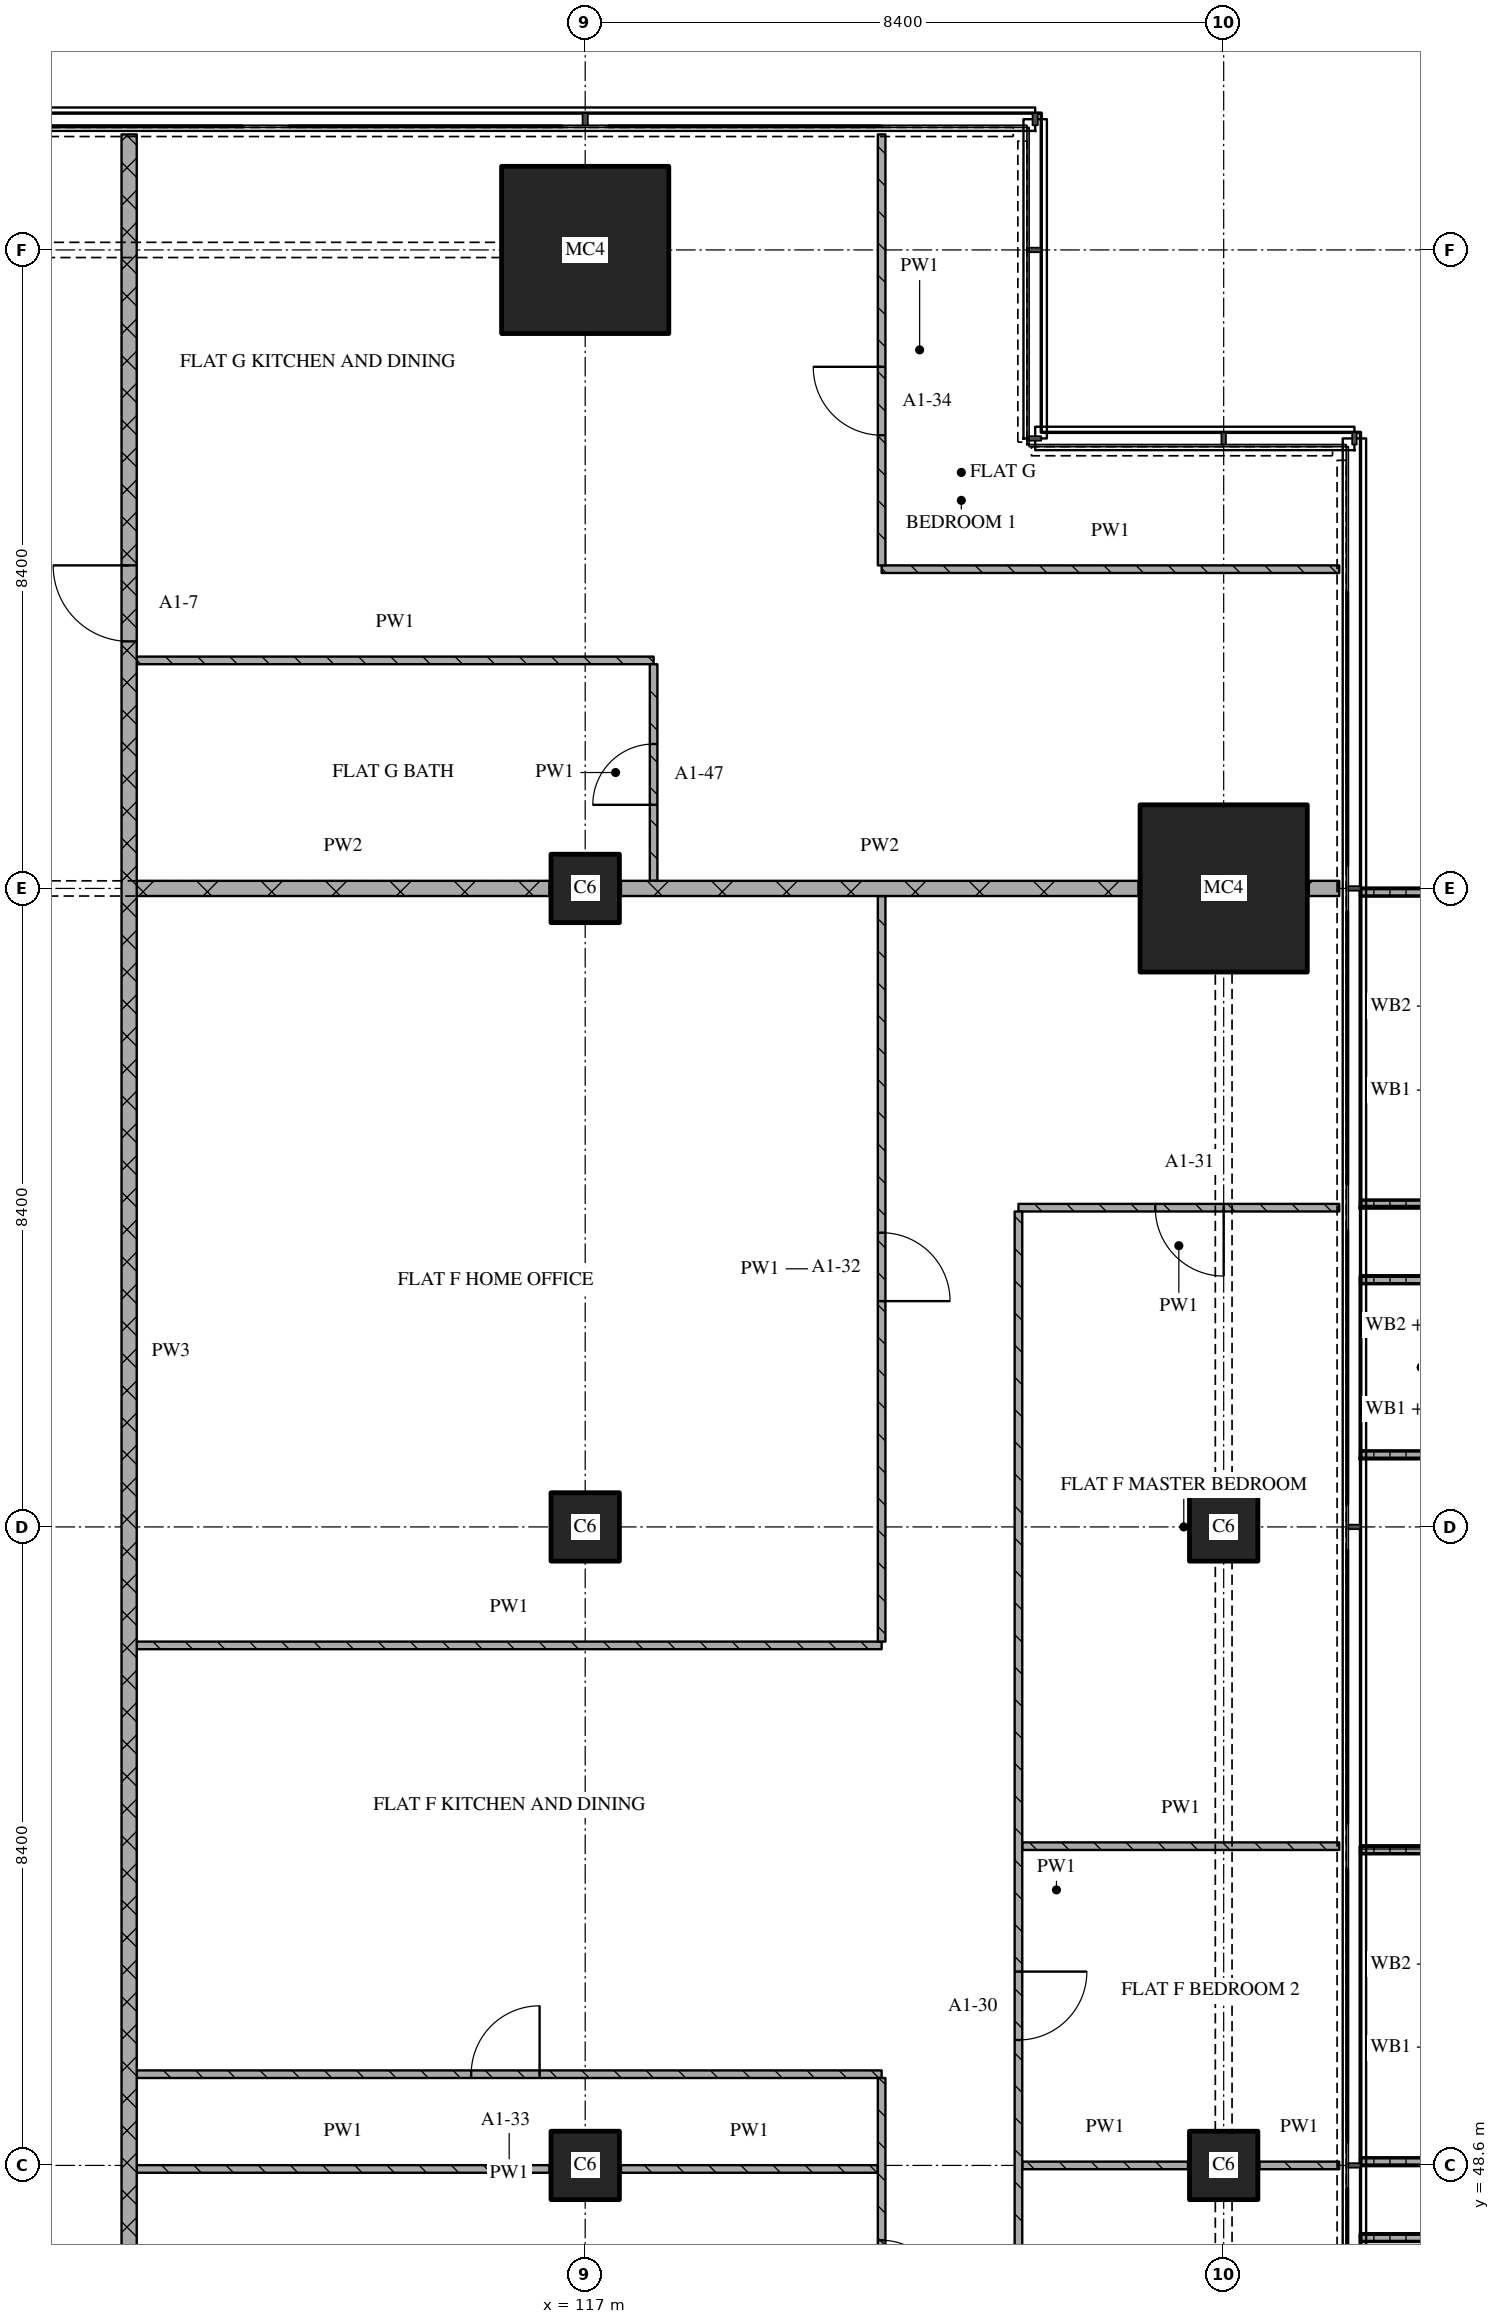
"""IFC4 building model, lengths in metres.
Left out: names, types, materials, properties, quantities, classifications, styles, units other than length and angle.
Written with IfcOpenShell. Run it as: python <this file> out.ifc"""

import sys

from ifc_helpers import new_model, si_unit, direction, frame, frame_2d, origin, origin_2d, place, context, subcontext, project, spatial, polyline, rectangle, outline, extrude, element, fill, save


model = new_model("IFC4")
c1 = context("Model", 3, precision=1e-05, world=origin(), true_north=direction((0.0, 1.0)))
c2 = subcontext(c1, "Body", "Model", "MODEL_VIEW")
j1 = project(units=[si_unit("LENGTHUNIT", "METRE"), si_unit("PLANEANGLEUNIT", "RADIAN")], contexts=[c1])
p1 = place(None, origin())
s1 = spatial("IfcSite", under=j1, at=p1, CompositionType="ELEMENT")
p2 = place(p1, origin())
s2 = spatial("IfcBuilding", under=s1, at=p2, CompositionType="ELEMENT")
p3 = place(p2, frame((0.0, 0.0, 40.8)))
s3 = spatial("IfcBuildingStorey", under=s2, at=p3, CompositionType="ELEMENT", Elevation=40.8)
for number, where, z_axis, x_axis in (
    (1, (117.0, 48.6, 0.0), (0.0, 0.0, 1.0), (1.0, 0.0, 0.0)),
    (2, (117.0, 57.0, 0.0), (0.0, 0.0, 1.0), (1.0, 0.0, 0.0)),
    (3, (117.0, 65.4, 0.0), (0.0, 0.0, 1.0), (1.0, 0.0, 0.0)),
):
    element("IfcColumn", number, at=place(p3, frame(where, z_axis=z_axis, x_axis=x_axis)), inside=s3, PredefinedType="COLUMN", context=c2, shape_type="SweptSolid", body=[
        extrude(rectangle(XDim=0.9, YDim=0.9, at=origin_2d()), origin(), (0.0, 0.0, 1.0), 3.6),
    ])
p4 = place(p3, frame((117.0, 73.8, 0.0), z_axis=(0.0, 0.0, 1.0), x_axis=(1.0, 0.0, 0.0)))
e4 = element("IfcColumn", 4, at=p4, inside=s3, PredefinedType="COLUMN", context=c2, shape_type="SweptSolid", body=[
    extrude(rectangle(XDim=2.2, YDim=2.2, at=origin_2d()), origin(), (0.0, 0.0, 1.0), 3.6),
])
for number, where, z_axis, x_axis in (
    (5, (125.4, 48.6, 0.0), (0.0, 0.0, 1.0), (1.0, 0.0, 0.0)),
    (6, (125.4, 57.0, 0.0), (0.0, 0.0, 1.0), (1.0, 0.0, 0.0)),
):
    element("IfcColumn", number, at=place(p3, frame(where, z_axis=z_axis, x_axis=x_axis)), inside=s3, PredefinedType="COLUMN", context=c2, shape_type="SweptSolid", body=[
        extrude(rectangle(XDim=0.9, YDim=0.9, at=origin_2d()), origin(), (0.0, 0.0, 1.0), 3.6),
    ])
p5 = place(p3, frame((125.4, 65.4, 0.0), z_axis=(0.0, 0.0, 1.0), x_axis=(1.0, 0.0, 0.0)))
e7 = element("IfcColumn", 7, at=p5, inside=s3, PredefinedType="COLUMN", context=c2, shape_type="SweptSolid", body=[
    extrude(rectangle(XDim=2.2, YDim=2.2, at=origin_2d()), origin(), (0.0, 0.0, 1.0), 3.6),
])
p6 = place(p3, origin())
e8 = element("IfcWall", 8, at=p6, inside=s3, PredefinedType="SOLIDWALL", context=c2, shape_type="SweptSolid", body=[
    extrude(outline(polyline([(127.2, 45.3), (127.2, 45.4), (128.7, 45.4), (128.7, 47.6), (127.2, 47.6), (127.2, 47.7), (128.8, 47.7), (128.8, 45.3), (127.2, 45.3)])), origin(), (0.0, 0.0, 1.0), 1.0),
])
p7 = place(p3, origin())
e9 = element("IfcWall", 9, at=p7, inside=s3, PredefinedType="SOLIDWALL", context=c2, shape_type="SweptSolid", body=[
    extrude(outline(polyline([(127.2, 48.6), (127.2, 48.7), (128.833, 48.7), (128.833, 52.7), (127.2, 52.7), (127.2, 52.8), (128.933, 52.8), (128.933, 48.6), (127.2, 48.6)])), origin(), (0.0, 0.0, 1.0), 1.0),
])
p8 = place(p3, origin())
e10 = element("IfcWall", 10, at=p8, inside=s3, PredefinedType="SOLIDWALL", context=c2, shape_type="SweptSolid", body=[
    extrude(outline(polyline([(127.2, 57.9), (127.2, 58.0), (128.7, 58.0), (128.7, 60.2), (127.2, 60.2), (127.2, 60.3), (128.8, 60.3), (128.8, 57.9), (127.2, 57.9)])), origin(), (0.0, 0.0, 1.0), 1.0),
])
p9 = place(p3, origin())
e11 = element("IfcWall", 11, at=p9, inside=s3, PredefinedType="SOLIDWALL", context=c2, shape_type="SweptSolid", body=[
    extrude(outline(polyline([(127.2, 61.2), (127.2, 61.3), (128.833, 61.3), (128.833, 65.3), (127.2, 65.3), (127.2, 65.4), (128.933, 65.4), (128.933, 61.2), (127.2, 61.2)])), origin(), (0.0, 0.0, 1.0), 1.0),
])
p10 = place(p3, frame((111.1, 48.553, 0.0), z_axis=(0.0, 0.0, 1.0), x_axis=(1.0, 0.0, 0.0)))
e12 = element("IfcWall", 12, at=p10, inside=s3, PredefinedType="PARTITIONING", context=c2, shape_type="SweptSolid", body=[
    extrude(rectangle(XDim=5.43, YDim=0.1, at=frame_2d((2.715, 0.0))), origin(), (0.0, 0.0, 1.0), 3.32),
])
p11 = place(p3, frame((117.47, 48.553, 0.0), z_axis=(0.0, 0.0, 1.0), x_axis=(1.0, 0.0, 0.0)))
e13 = element("IfcWall", 13, at=p11, inside=s3, PredefinedType="PARTITIONING", context=c2, shape_type="SweptSolid", body=[
    extrude(rectangle(XDim=3.38, YDim=0.1, at=frame_2d((1.69, 0.0))), origin(), (0.0, 0.0, 1.0), 3.32),
])
p12 = place(p3, frame((122.75, 48.6, 0.0), z_axis=(0.0, 0.0, 1.0), x_axis=(1.0, 0.0, 0.0)))
e14 = element("IfcWall", 14, at=p12, inside=s3, PredefinedType="PARTITIONING", context=c2, shape_type="SweptSolid", body=[
    extrude(rectangle(XDim=2.18, YDim=0.1, at=frame_2d((1.09, 0.0))), origin(), (0.0, 0.0, 1.0), 3.32),
])
p13 = place(p3, frame((125.87, 48.6, 0.0), z_axis=(0.0, 0.0, 1.0), x_axis=(1.0, 0.0, 0.0)))
e15 = element("IfcWall", 15, at=p13, inside=s3, PredefinedType="PARTITIONING", context=c2, shape_type="SweptSolid", body=[
    extrude(rectangle(XDim=1.05, YDim=0.1, at=frame_2d((0.525, 0.0))), origin(), (0.0, 0.0, 1.0), 3.32),
])
p14 = place(p3, frame((120.9, 49.8, 0.0), z_axis=(0.0, 0.0, 1.0), x_axis=(-1.0, 0.0, 0.0)))
e16 = element("IfcWall", 16, at=p14, inside=s3, PredefinedType="PARTITIONING", context=c2, shape_type="SweptSolid", body=[
    extrude(rectangle(XDim=9.8, YDim=0.1, at=frame_2d((4.9, 0.0))), origin(), (0.0, 0.0, 1.0), 3.32),
])
p15 = place(p14, frame((4.5, 0.0, 0.0)))
e17 = element("IfcOpeningElement", 17, at=p15, cuts=e16, PredefinedType="OPENING", context=c2, shape_type="SweptSolid", body=[
    extrude(rectangle(XDim=0.9, YDim=2.1, at=frame_2d((0.45, 1.05))), frame((0.0, 0.06, 0.0), z_axis=(0.0, -1.0, 0.0), x_axis=(1.0, 0.0, 0.0)), (0.0, 0.0, 1.0), 0.12),
])
p16 = place(p3, frame((122.75, 52.8, 0.0), z_axis=(0.0, 0.0, 1.0), x_axis=(1.0, 0.0, 0.0)))
e18 = element("IfcWall", 18, at=p16, inside=s3, PredefinedType="PARTITIONING", context=c2, shape_type="SweptSolid", body=[
    extrude(rectangle(XDim=4.17, YDim=0.1, at=frame_2d((2.085, 0.0))), origin(), (0.0, 0.0, 1.0), 3.32),
])
p17 = place(p3, frame((111.1, 55.441, 0.0), z_axis=(0.0, 0.0, 1.0), x_axis=(1.0, 0.0, 0.0)))
e19 = element("IfcWall", 19, at=p17, inside=s3, PredefinedType="PARTITIONING", context=c2, shape_type="SweptSolid", body=[
    extrude(rectangle(XDim=9.8, YDim=0.1, at=frame_2d((4.9, 0.0))), origin(), (0.0, 0.0, 1.0), 3.32),
])
p18 = place(p3, frame((126.92, 61.2, 0.0), z_axis=(0.0, 0.0, 1.0), x_axis=(-1.0, 0.0, 0.0)))
e20 = element("IfcWall", 20, at=p18, inside=s3, PredefinedType="PARTITIONING", context=c2, shape_type="SweptSolid", body=[
    extrude(rectangle(XDim=4.22, YDim=0.1, at=frame_2d((2.11, 0.0))), origin(), (0.0, 0.0, 1.0), 3.32),
])
p19 = place(p18, frame((1.52, 0.0, 0.0)))
e21 = element("IfcOpeningElement", 21, at=p19, cuts=e20, PredefinedType="OPENING", context=c2, shape_type="SweptSolid", body=[
    extrude(rectangle(XDim=0.9, YDim=2.1, at=frame_2d((0.45, 1.05))), frame((0.0, 0.06, 0.0), z_axis=(0.0, -1.0, 0.0), x_axis=(1.0, 0.0, 0.0)), (0.0, 0.0, 1.0), 0.12),
])
p20 = place(p3, frame((111.1, 65.4, 0.0), z_axis=(0.0, 0.0, 1.0), x_axis=(1.0, 0.0, 0.0)))
e22 = element("IfcWall", 22, at=p20, inside=s3, PredefinedType="PARTITIONING", context=c2, shape_type="SweptSolid", body=[
    extrude(rectangle(XDim=5.43, YDim=0.2, at=frame_2d((2.715, 0.0))), origin(), (0.0, 0.0, 1.0), 2.82),
])
p21 = place(p3, frame((117.47, 65.4, 0.0), z_axis=(0.0, 0.0, 1.0), x_axis=(1.0, 0.0, 0.0)))
e23 = element("IfcWall", 23, at=p21, inside=s3, PredefinedType="PARTITIONING", context=c2, shape_type="SweptSolid", body=[
    extrude(rectangle(XDim=6.81, YDim=0.2, at=frame_2d((3.405, 0.0))), origin(), (0.0, 0.0, 1.0), 3.32),
])
p22 = place(p3, frame((126.52, 65.4, 0.0), z_axis=(0.0, 0.0, 1.0), x_axis=(1.0, 0.0, 0.0)))
e24 = element("IfcWall", 24, at=p22, inside=s3, PredefinedType="PARTITIONING", context=c2, shape_type="SweptSolid", body=[
    extrude(rectangle(XDim=0.4, YDim=0.2, at=frame_2d((0.2, 0.0))), origin(), (0.0, 0.0, 1.0), 3.32),
])
p23 = place(p3, frame((111.1, 68.4, 0.0), z_axis=(0.0, 0.0, 1.0), x_axis=(1.0, 0.0, 0.0)))
e25 = element("IfcWall", 25, at=p23, inside=s3, PredefinedType="PARTITIONING", context=c2, shape_type="SweptSolid", body=[
    extrude(rectangle(XDim=6.8, YDim=0.1, at=frame_2d((3.4, 0.0))), origin(), (0.0, 0.0, 1.0), 3.32),
])
p24 = place(p3, frame((120.9, 69.6, 0.0), z_axis=(0.0, 0.0, 1.0), x_axis=(1.0, 0.0, 0.0)))
e26 = element("IfcWall", 26, at=p24, inside=s3, PredefinedType="PARTITIONING", context=c2, shape_type="SweptSolid", body=[
    extrude(rectangle(XDim=6.02, YDim=0.1, at=frame_2d((3.01, 0.0))), origin(), (0.0, 0.0, 1.0), 3.32),
])
p25 = place(p3, frame((111.0, 75.32, 0.0), z_axis=(0.0, 0.0, 1.0), x_axis=(0.0, -1.0, 0.0)))
e27 = element("IfcWall", 27, at=p25, inside=s3, PredefinedType="PARTITIONING", context=c2, shape_type="SweptSolid", body=[
    extrude(rectangle(XDim=32.02, YDim=0.2, at=frame_2d((16.01, 0.0))), origin(), (0.0, 0.0, 1.0), 3.32),
])
p26 = place(p25, frame((5.67, 0.0, 0.0)))
e28 = element("IfcOpeningElement", 28, at=p26, cuts=e27, PredefinedType="OPENING", context=c2, shape_type="SweptSolid", body=[
    extrude(rectangle(XDim=1.0, YDim=2.1, at=frame_2d((0.5, 1.05))), frame((0.0, 0.11, 0.0), z_axis=(0.0, -1.0, 0.0), x_axis=(1.0, 0.0, 0.0)), (0.0, 0.0, 1.0), 0.22),
])
p27 = place(p3, frame((117.9, 65.5, 0.0), z_axis=(0.0, 0.0, 1.0), x_axis=(0.0, 1.0, 0.0)))
e29 = element("IfcWall", 29, at=p27, inside=s3, PredefinedType="PARTITIONING", context=c2, shape_type="SweptSolid", body=[
    extrude(rectangle(XDim=2.85, YDim=0.1, at=frame_2d((1.425, 0.0))), origin(), (0.0, 0.0, 1.0), 3.32),
])
p28 = place(p27, frame((1.0, 0.0, 0.0)))
e30 = element("IfcOpeningElement", 30, at=p28, cuts=e29, PredefinedType="OPENING", context=c2, shape_type="SweptSolid", body=[
    extrude(rectangle(XDim=0.8, YDim=2.1, at=frame_2d((0.4, 1.05))), frame((0.0, 0.06, 0.0), z_axis=(0.0, -1.0, 0.0), x_axis=(1.0, 0.0, 0.0)), (0.0, 0.0, 1.0), 0.12),
])
p29 = place(p3, frame((120.9, 43.3, 0.0), z_axis=(0.0, 0.0, 1.0), x_axis=(0.0, 1.0, 0.0)))
e31 = element("IfcWall", 31, at=p29, inside=s3, PredefinedType="PARTITIONING", context=c2, shape_type="SweptSolid", body=[
    extrude(rectangle(XDim=6.45, YDim=0.1, at=frame_2d((3.225, 0.0))), origin(), (0.0, 0.0, 1.0), 3.32),
])
p30 = place(p29, frame((0.838, 0.0, 0.0)))
e32 = element("IfcOpeningElement", 32, at=p30, cuts=e31, PredefinedType="OPENING", context=c2, shape_type="SweptSolid", body=[
    extrude(rectangle(XDim=0.8, YDim=2.1, at=frame_2d((0.4, 1.05))), frame((0.0, 0.06, 0.0), z_axis=(0.0, -1.0, 0.0), x_axis=(1.0, 0.0, 0.0)), (0.0, 0.0, 1.0), 0.12),
])
p31 = place(p29, frame((3.515, 0.0, 0.0)))
e33 = element("IfcOpeningElement", 33, at=p31, cuts=e31, PredefinedType="OPENING", context=c2, shape_type="SweptSolid", body=[
    extrude(rectangle(XDim=0.8, YDim=2.1, at=frame_2d((0.4, 1.05))), frame((0.0, 0.06, 0.0), z_axis=(0.0, -1.0, 0.0), x_axis=(1.0, 0.0, 0.0)), (0.0, 0.0, 1.0), 0.12),
])
p32 = place(p3, frame((120.9, 55.491, 0.0), z_axis=(0.0, 0.0, 1.0), x_axis=(0.0, 1.0, 0.0)))
e34 = element("IfcWall", 34, at=p32, inside=s3, PredefinedType="PARTITIONING", context=c2, shape_type="SweptSolid", body=[
    extrude(rectangle(XDim=9.809, YDim=0.1, at=frame_2d((4.904, 0.0))), origin(), (0.0, 0.0, 1.0), 3.32),
])
p33 = place(p32, frame((4.479, 0.0, 0.0)))
e35 = element("IfcOpeningElement", 35, at=p33, cuts=e34, PredefinedType="OPENING", context=c2, shape_type="SweptSolid", body=[
    extrude(rectangle(XDim=0.9, YDim=2.1, at=frame_2d((0.45, 1.05))), frame((0.0, 0.06, 0.0), z_axis=(0.0, -1.0, 0.0), x_axis=(1.0, 0.0, 0.0)), (0.0, 0.0, 1.0), 0.12),
])
p34 = place(p3, frame((120.9, 75.32, 0.0), z_axis=(0.0, 0.0, 1.0), x_axis=(0.0, -1.0, 0.0)))
e36 = element("IfcWall", 36, at=p34, inside=s3, PredefinedType="PARTITIONING", context=c2, shape_type="SweptSolid", body=[
    extrude(rectangle(XDim=5.67, YDim=0.1, at=frame_2d((2.835, 0.0))), origin(), (0.0, 0.0, 1.0), 3.32),
])
p35 = place(p34, frame((3.058, 0.0, 0.0)))
e37 = element("IfcOpeningElement", 37, at=p35, cuts=e36, PredefinedType="OPENING", context=c2, shape_type="SweptSolid", body=[
    extrude(rectangle(XDim=0.9, YDim=2.1, at=frame_2d((0.45, 1.05))), frame((0.0, 0.06, 0.0), z_axis=(0.0, -1.0, 0.0), x_axis=(1.0, 0.0, 0.0)), (0.0, 0.0, 1.0), 0.12),
])
p36 = place(p3, frame((122.7, 61.15, 0.0), z_axis=(0.0, 0.0, 1.0), x_axis=(0.0, -1.0, 0.0)))
e38 = element("IfcWall", 38, at=p36, inside=s3, PredefinedType="PARTITIONING", context=c2, shape_type="SweptSolid", body=[
    extrude(rectangle(XDim=17.85, YDim=0.1, at=frame_2d((8.925, 0.0))), origin(), (0.0, 0.0, 1.0), 3.32),
])
p37 = place(p36, frame((10.0, 0.0, 0.0)))
e39 = element("IfcOpeningElement", 39, at=p37, cuts=e38, PredefinedType="OPENING", context=c2, shape_type="SweptSolid", body=[
    extrude(rectangle(XDim=0.9, YDim=2.1, at=frame_2d((0.45, 1.05))), frame((0.0, 0.06, 0.0), z_axis=(0.0, -1.0, 0.0), x_axis=(1.0, 0.0, 0.0)), (0.0, 0.0, 1.0), 0.12),
])
p38 = place(p36, frame((14.8, 0.0, 0.0)))
e40 = element("IfcOpeningElement", 40, at=p38, cuts=e38, PredefinedType="OPENING", context=c2, shape_type="SweptSolid", body=[
    extrude(rectangle(XDim=0.9, YDim=2.1, at=frame_2d((0.45, 1.05))), frame((0.0, 0.06, 0.0), z_axis=(0.0, -1.0, 0.0), x_axis=(1.0, 0.0, 0.0)), (0.0, 0.0, 1.0), 0.12),
])
p39 = place(p15, origin())
e41 = element("IfcDoor", 41, at=p39, inside=s3, OperationType="SINGLE_SWING_RIGHT", PredefinedType="DOOR", context=c2, shape_type="SweptSolid", body=[
    extrude(rectangle(XDim=0.9, YDim=2.1, at=frame_2d((0.45, 1.05))), frame((0.0, 0.025, 0.0), z_axis=(0.0, -1.0, 0.0), x_axis=(1.0, 0.0, 0.0)), (0.0, 0.0, 1.0), 0.05),
])
fill(e17, e41)
p40 = place(p19, origin())
e42 = element("IfcDoor", 42, at=p40, inside=s3, OperationType="SINGLE_SWING_LEFT", PredefinedType="DOOR", context=c2, shape_type="SweptSolid", body=[
    extrude(rectangle(XDim=0.9, YDim=2.1, at=frame_2d((0.45, 1.05))), frame((0.0, 0.025, 0.0), z_axis=(0.0, -1.0, 0.0), x_axis=(1.0, 0.0, 0.0)), (0.0, 0.0, 1.0), 0.05),
])
fill(e21, e42)
p41 = place(p26, origin())
e43 = element("IfcDoor", 43, at=p41, inside=s3, OperationType="SINGLE_SWING_RIGHT", PredefinedType="DOOR", context=c2, shape_type="SweptSolid", body=[
    extrude(rectangle(XDim=1.0, YDim=2.1, at=frame_2d((0.5, 1.05))), frame((0.0, 0.025, 0.0), z_axis=(0.0, -1.0, 0.0), x_axis=(1.0, 0.0, 0.0)), (0.0, 0.0, 1.0), 0.05),
])
fill(e28, e43)
p42 = place(p28, origin())
e44 = element("IfcDoor", 44, at=p42, inside=s3, OperationType="SINGLE_SWING_LEFT", PredefinedType="DOOR", context=c2, shape_type="SweptSolid", body=[
    extrude(rectangle(XDim=0.8, YDim=2.1, at=frame_2d((0.4, 1.05))), frame((0.0, 0.025, 0.0), z_axis=(0.0, -1.0, 0.0), x_axis=(1.0, 0.0, 0.0)), (0.0, 0.0, 1.0), 0.05),
])
fill(e30, e44)
p43 = place(p31, origin())
e45 = element("IfcDoor", 45, at=p43, inside=s3, OperationType="SINGLE_SWING_RIGHT", PredefinedType="DOOR", context=c2, shape_type="SweptSolid", body=[
    extrude(rectangle(XDim=0.8, YDim=2.1, at=frame_2d((0.4, 1.05))), frame((0.0, 0.025, 0.0), z_axis=(0.0, -1.0, 0.0), x_axis=(1.0, 0.0, 0.0)), (0.0, 0.0, 1.0), 0.05),
])
fill(e33, e45)
p44 = place(p33, origin())
e46 = element("IfcDoor", 46, at=p44, inside=s3, OperationType="SINGLE_SWING_RIGHT", PredefinedType="DOOR", context=c2, shape_type="SweptSolid", body=[
    extrude(rectangle(XDim=0.9, YDim=2.1, at=frame_2d((0.45, 1.05))), frame((0.0, 0.025, 0.0), z_axis=(0.0, -1.0, 0.0), x_axis=(1.0, 0.0, 0.0)), (0.0, 0.0, 1.0), 0.05),
])
fill(e35, e46)
p45 = place(p35, origin())
e47 = element("IfcDoor", 47, at=p45, inside=s3, OperationType="SINGLE_SWING_RIGHT", PredefinedType="DOOR", context=c2, shape_type="SweptSolid", body=[
    extrude(rectangle(XDim=0.9, YDim=2.1, at=frame_2d((0.45, 1.05))), frame((0.0, 0.025, 0.0), z_axis=(0.0, -1.0, 0.0), x_axis=(1.0, 0.0, 0.0)), (0.0, 0.0, 1.0), 0.05),
])
fill(e37, e47)
p46 = place(p37, origin())
e48 = element("IfcDoor", 48, at=p46, inside=s3, OperationType="SINGLE_SWING_LEFT", PredefinedType="DOOR", context=c2, shape_type="SweptSolid", body=[
    extrude(rectangle(XDim=0.9, YDim=2.1, at=frame_2d((0.45, 1.05))), frame((0.0, 0.025, 0.0), z_axis=(0.0, -1.0, 0.0), x_axis=(1.0, 0.0, 0.0)), (0.0, 0.0, 1.0), 0.05),
])
fill(e39, e48)
save(model, sys.argv[1])
